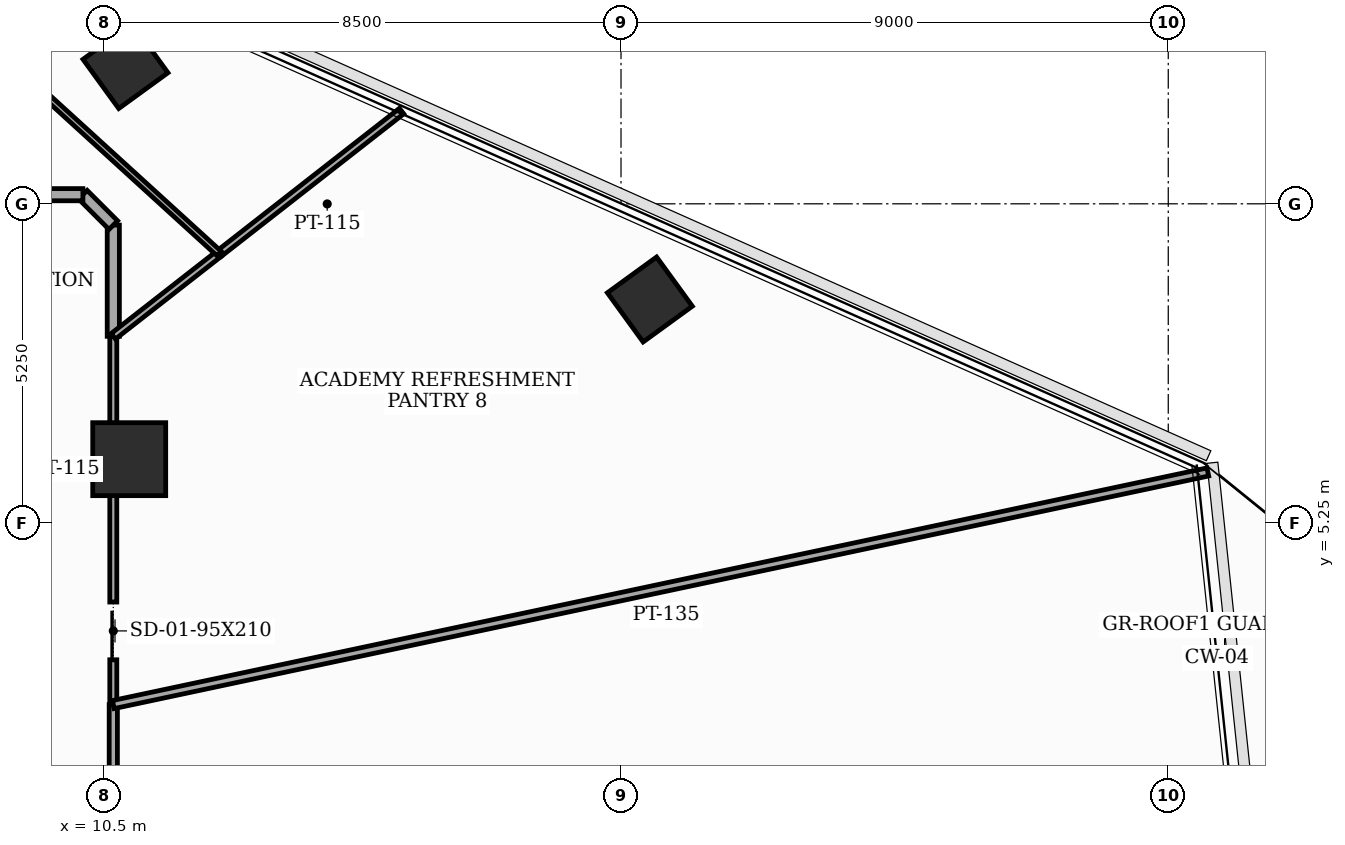
"""IFC4 building model, lengths in metres.
Left out: names, types, materials, properties, quantities, classifications, styles, units other than length and angle.
Written with IfcOpenShell. Run it as: python <this file> out.ifc"""

import sys

from ifc_helpers import new_model, si_unit, direction, frame, frame_2d, origin, origin_2d, place, context, subcontext, project, spatial, rectangle, extrude, element, fill, save


model = new_model("IFC4")
c1 = context("Model", 3, precision=1e-05, world=origin(), true_north=direction((0.0, 1.0)))
c2 = subcontext(c1, "Body", "Model", "MODEL_VIEW")
j1 = project(units=[si_unit("LENGTHUNIT", "METRE"), si_unit("PLANEANGLEUNIT", "RADIAN")], contexts=[c1])
p1 = place(None, origin())
s1 = spatial("IfcSite", under=j1, at=p1, CompositionType="ELEMENT")
p2 = place(p1, origin())
s2 = spatial("IfcBuilding", under=s1, at=p2, CompositionType="ELEMENT")
p3 = place(p2, frame((0.0, 0.0, 165.7)))
s3 = spatial("IfcBuildingStorey", under=s2, at=p3, CompositionType="ELEMENT", Elevation=165.7)
p4 = place(p3, frame((10.912, 6.3, 0.0), z_axis=(0.0, 0.0, 1.0), x_axis=(1.0, 0.0, 0.0)))
e1 = element("IfcColumn", 1, at=p4, inside=s3, PredefinedType="COLUMN", context=c2, shape_type="SweptSolid", body=[
    extrude(rectangle(XDim=1.2, YDim=1.2, at=origin_2d()), origin(), (0.0, 0.0, 1.0), 3.7),
])
for number, where, z_axis, x_axis in (
    (2, (19.474, 8.926, 0.0), (0.0, 0.0, 1.0), (0.809, 0.588, 0.0)),
    (3, (10.85, 12.766, 0.0), (0.0, 0.0, 1.0), (0.809, 0.588, 0.0)),
):
    element("IfcColumn", number, at=place(p3, frame(where, z_axis=z_axis, x_axis=x_axis)), inside=s3, PredefinedType="COLUMN", context=c2, shape_type="SweptSolid", body=[
        extrude(rectangle(XDim=1.0, YDim=1.0, at=origin_2d()), origin(), (0.0, 0.0, 1.0), 3.7),
    ])
p5 = place(p3, frame((10.65, -5.194, 0.0), z_axis=(0.0, 0.0, 1.0), x_axis=(0.0, 1.0, 0.0)))
e4 = element("IfcWall", 4, at=p5, inside=s3, PredefinedType="PARTITIONING", context=c2, shape_type="SweptSolid", body=[
    extrude(rectangle(XDim=7.458, YDim=0.135, at=frame_2d((3.729, 0.0))), origin(), (0.0, 0.0, 1.0), 2.885),
])
p6 = place(p5, frame((3.254, 0.0, 0.0)))
e5 = element("IfcOpeningElement", 5, at=p6, cuts=e4, PredefinedType="OPENING", context=c2, shape_type="SweptSolid", body=[
    extrude(rectangle(XDim=0.95, YDim=2.1, at=frame_2d((0.475, 1.05))), frame((0.0, 0.077, 0.0), z_axis=(0.0, -1.0, 0.0), x_axis=(1.0, 0.0, 0.0)), (0.0, 0.0, 1.0), 0.155),
])
p7 = place(p3, frame((10.65, 2.264, 0.0), z_axis=(0.0, 0.0, 1.0), x_axis=(0.0, 1.0, 0.0)))
e6 = element("IfcWall", 6, at=p7, inside=s3, PredefinedType="PARTITIONING", context=c2, shape_type="SweptSolid", body=[
    extrude(rectangle(XDim=6.057, YDim=0.115, at=frame_2d((3.029, 0.0))), origin(), (0.0, 0.0, 1.0), 2.885),
])
p8 = place(p7, frame((0.736, 0.0, 0.0)))
e7 = element("IfcOpeningElement", 7, at=p8, cuts=e6, PredefinedType="OPENING", context=c2, shape_type="SweptSolid", body=[
    extrude(rectangle(XDim=0.95, YDim=2.1, at=frame_2d((0.475, 1.05))), frame((0.0, 0.067, 0.0), z_axis=(0.0, -1.0, 0.0), x_axis=(1.0, 0.0, 0.0)), (0.0, 0.0, 1.0), 0.135),
])
p9 = place(p3, frame((10.65, 8.321, 0.0), z_axis=(0.0, 0.0, 1.0), x_axis=(0.0, 1.0, 0.0)))
e8 = element("IfcWall", 8, at=p9, inside=s3, PredefinedType="SOLIDWALL", context=c2, shape_type="SweptSolid", body=[
    extrude(rectangle(XDim=1.829, YDim=0.2, at=frame_2d((0.915, 0.0))), origin(), (0.0, 0.0, 1.0), 3.5),
])
p10 = place(p3, frame((10.65, 10.15, 0.0), z_axis=(0.0, 0.0, 1.0), x_axis=(-0.707106781187, 0.707106781187, 0.0)))
e9 = element("IfcWall", 9, at=p10, inside=s3, PredefinedType="SOLIDWALL", context=c2, shape_type="SweptSolid", body=[
    extrude(rectangle(XDim=0.707, YDim=0.2, at=frame_2d((0.354, 0.0))), origin(), (0.0, 0.0, 1.0), 3.5),
])
p11 = place(p3, frame((10.15, 10.65, 0.0), z_axis=(0.0, 0.0, 1.0), x_axis=(-1.0, 0.0, 0.0)))
e10 = element("IfcWall", 10, at=p11, inside=s3, PredefinedType="SOLIDWALL", context=c2, shape_type="SweptSolid", body=[
    extrude(rectangle(XDim=12.414, YDim=0.2, at=frame_2d((6.207, 0.0))), origin(), (0.0, 0.0, 1.0), 2.885),
])
p12 = place(p11, frame((7.222, 0.0, 0.0)))
e11 = element("IfcOpeningElement", 11, at=p12, cuts=e10, PredefinedType="OPENING", context=c2, shape_type="SweptSolid", body=[
    extrude(rectangle(XDim=0.95, YDim=2.1, at=frame_2d((0.475, 1.05))), frame((0.0, 0.11, 0.0), z_axis=(0.0, -1.0, 0.0), x_axis=(1.0, 0.0, 0.0)), (0.0, 0.0, 1.0), 0.22),
])
p13 = place(p3, frame((28.651, 6.09, 0.0), z_axis=(0.0, 0.0, 1.0), x_axis=(-0.978150893197, -0.207896200392, 0.0)))
e12 = element("IfcWall", 12, at=p13, inside=s3, PredefinedType="PARTITIONING", context=c2, shape_type="SweptSolid", body=[
    extrude(rectangle(XDim=18.403, YDim=0.135, at=frame_2d((9.202, 0.0))), origin(), (0.0, 0.0, 1.0), 2.885),
])
p14 = place(p3, frame((15.391, 12.025, 0.0), z_axis=(0.0, 0.0, 1.0), x_axis=(-0.787968951689, -0.615714975597, 0.0)))
e13 = element("IfcWall", 13, at=p14, inside=s3, PredefinedType="PARTITIONING", context=c2, shape_type="SweptSolid", body=[
    extrude(rectangle(XDim=3.807, YDim=0.115, at=frame_2d((1.903, 0.0))), origin(), (0.0, 0.0, 1.0), 2.985),
])
p15 = place(p3, frame((12.391, 9.681, 0.0), z_axis=(0.0, 0.0, 1.0), x_axis=(-0.788124883644, -0.615515367624, 0.0)))
e14 = element("IfcWall", 14, at=p15, inside=s3, PredefinedType="PARTITIONING", context=c2, shape_type="SweptSolid", body=[
    extrude(rectangle(XDim=2.209, YDim=0.115, at=frame_2d((1.104, 0.0))), origin(), (0.0, 0.0, 1.0), 3.5),
])
p16 = place(p3, frame((8.177, 13.52, 0.0), z_axis=(0.0, 0.0, 1.0), x_axis=(0.739232344885, -0.673450473514, 0.0)))
e15 = element("IfcWall", 15, at=p16, inside=s3, PredefinedType="MOVABLE", context=c2, shape_type="SweptSolid", body=[
    extrude(rectangle(XDim=5.701, YDim=0.1, at=frame_2d((2.85, 0.0))), origin(), (0.0, 0.0, 1.0), 2.885),
])
p17 = place(p8, origin())
e16 = element("IfcDoor", 16, at=p17, inside=s3, OperationType="SLIDING_TO_LEFT", PredefinedType="DOOR", context=c2, shape_type="SweptSolid", body=[
    extrude(rectangle(XDim=0.95, YDim=2.1, at=frame_2d((0.475, 1.05))), frame((0.0, 0.025, 0.0), z_axis=(0.0, -1.0, 0.0), x_axis=(1.0, 0.0, 0.0)), (0.0, 0.0, 1.0), 0.05),
])
fill(e7, e16)
save(model, sys.argv[1])
